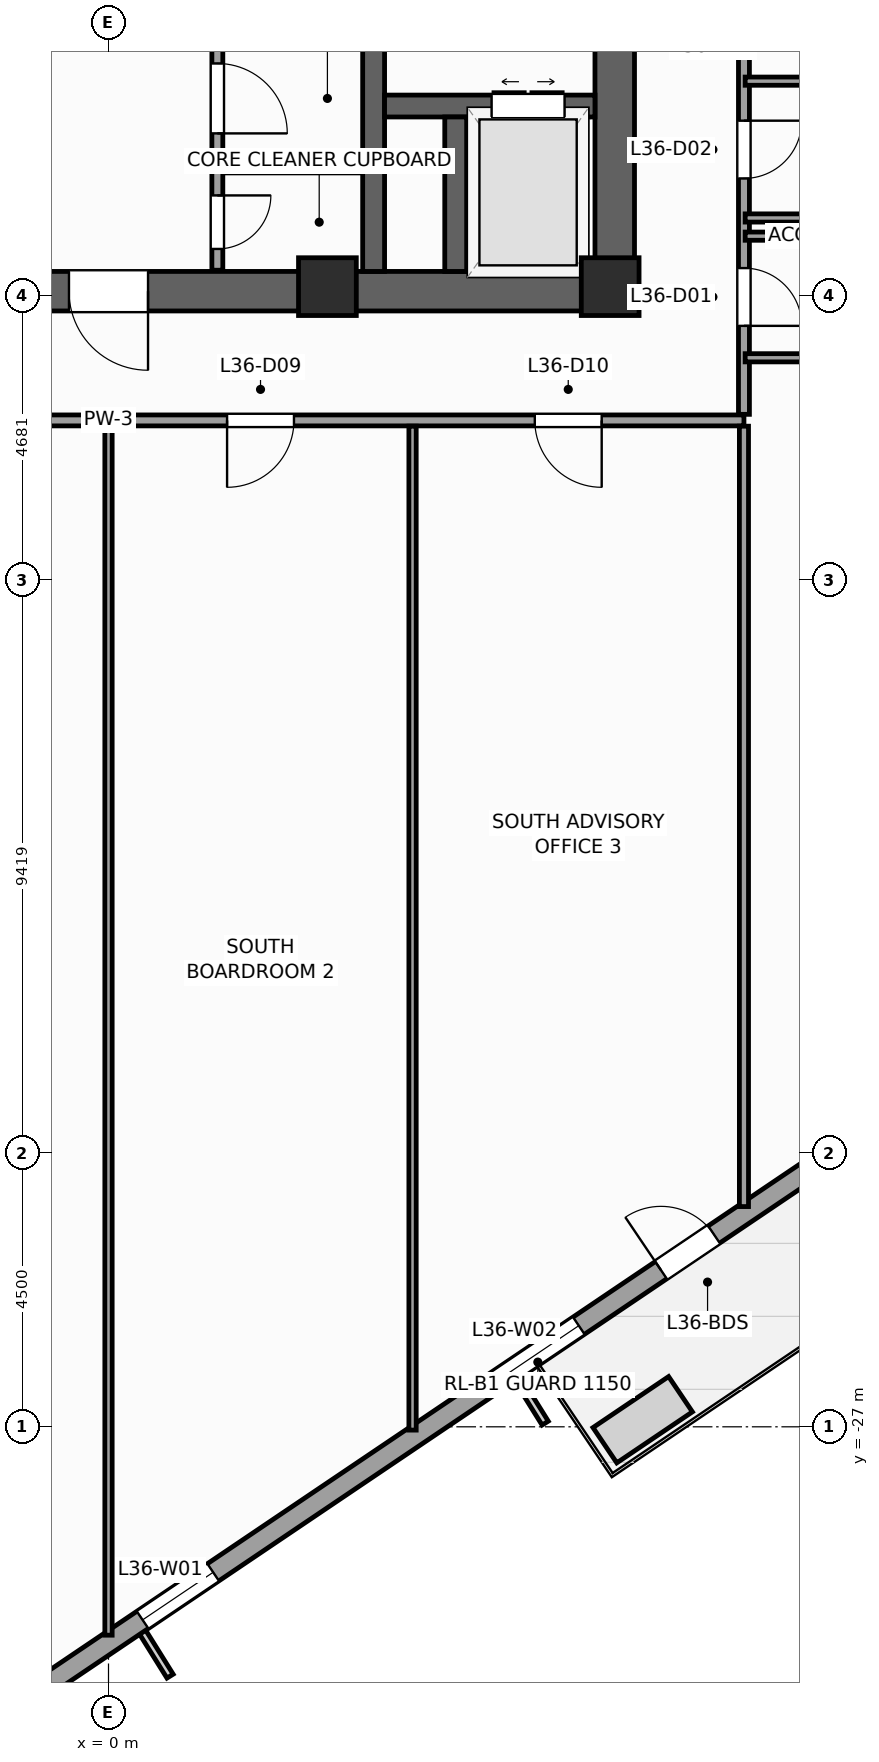
"""IFC4 building model, lengths in metres.
Left out: names, types, materials, properties, quantities, classifications, styles, units other than length and angle.
Written with IfcOpenShell. Run it as: python <this file> out.ifc"""

import sys

from ifc_helpers import new_model, si_unit, direction, frame, frame_2d, origin, origin_2d, place, context, subcontext, project, spatial, rectangle, extrude, source, transform, mapped, element, fill, save


model = new_model("IFC4")
c1 = context("Model", 3, precision=1e-05, world=origin(), true_north=direction((0.0, 1.0)))
c2 = subcontext(c1, "Body", "Model", "MODEL_VIEW")
j1 = project(units=[si_unit("LENGTHUNIT", "METRE"), si_unit("PLANEANGLEUNIT", "RADIAN")], contexts=[c1])
p1 = place(None, origin())
s1 = spatial("IfcSite", under=j1, at=p1, CompositionType="ELEMENT")
p2 = place(p1, origin())
s2 = spatial("IfcBuilding", under=s1, at=p2, CompositionType="ELEMENT")
p3 = place(p2, frame((0.0, 0.0, 152.4)))
s3 = spatial("IfcBuildingStorey", under=s2, at=p3, CompositionType="ELEMENT", Elevation=152.4)
p4 = place(p3, frame((-8.65, -8.325, 0.0), z_axis=(0.0, 0.0, 1.0), x_axis=(1.0, 0.0, 0.0)))
e1 = element("IfcWall", 1, at=p4, inside=s3, PredefinedType="SHEAR", context=c2, shape_type="SweptSolid", body=[
    extrude(rectangle(XDim=17.3, YDim=0.65, at=frame_2d((8.65, 0.0))), origin(), (0.0, 0.0, 1.0), 4.0),
])
p5 = place(p4, frame((8.0, 0.0, 0.0)))
e2 = element("IfcOpeningElement", 2, at=p5, cuts=e1, PredefinedType="OPENING", context=c2, shape_type="SweptSolid", body=[
    extrude(rectangle(XDim=1.3, YDim=2.2, at=frame_2d((0.65, 1.1))), frame((0.0, 0.335, 0.0), z_axis=(0.0, -1.0, 0.0), x_axis=(1.0, 0.0, 0.0)), (0.0, 0.0, 1.0), 0.67),
])
p6 = place(p3, frame((8.325, -8.0, 0.0), z_axis=(0.0, 0.0, 1.0), x_axis=(0.0, 1.0, 0.0)))
e3 = element("IfcWall", 3, at=p6, inside=s3, PredefinedType="SHEAR", context=c2, shape_type="SweptSolid", body=[
    extrude(rectangle(XDim=16.0, YDim=0.65, at=frame_2d((8.0, 0.0))), origin(), (0.0, 0.0, 1.0), 4.0),
])
p7 = place(p6, frame((4.69, 0.0, 0.0)))
e4 = element("IfcOpeningElement", 4, at=p7, cuts=e3, PredefinedType="OPENING", context=c2, shape_type="SweptSolid", body=[
    extrude(rectangle(XDim=1.3, YDim=2.2, at=frame_2d((0.65, 1.1))), frame((0.0, 0.335, 0.0), z_axis=(0.0, -1.0, 0.0), x_axis=(1.0, 0.0, 0.0)), (0.0, 0.0, 1.0), 0.67),
])
p8 = place(p3, frame((4.36, -8.0, 0.0), z_axis=(0.0, 0.0, 1.0), x_axis=(0.0, 1.0, 0.0)))
e5 = element("IfcWall", 5, at=p8, inside=s3, PredefinedType="SHEAR", context=c2, shape_type="SweptSolid", body=[
    extrude(rectangle(XDim=16.0, YDim=0.36, at=frame_2d((8.0, 0.0))), origin(), (0.0, 0.0, 1.0), 4.0),
])
p9 = place(p3, frame((4.54, -5.28, 0.0), z_axis=(0.0, 0.0, 1.0), x_axis=(1.0, 0.0, 0.0)))
e6 = element("IfcWall", 6, at=p9, inside=s3, PredefinedType="SHEAR", context=c2, shape_type="SweptSolid", body=[
    extrude(rectangle(XDim=3.46, YDim=0.36, at=frame_2d((1.73, 0.0))), origin(), (0.0, 0.0, 1.0), 4.0),
])
p10 = place(p9, frame((1.76, 0.0, 0.0)))
e7 = element("IfcOpeningElement", 7, at=p10, cuts=e6, PredefinedType="OPENING", context=c2, shape_type="SweptSolid", body=[
    extrude(rectangle(XDim=1.2, YDim=2.25, at=frame_2d((0.6, 1.125))), frame((0.0, 0.19, 0.0), z_axis=(0.0, -1.0, 0.0), x_axis=(1.0, 0.0, 0.0)), (0.0, 0.0, 1.0), 0.38),
])
p11 = place(p3, frame((5.71, -8.0, 0.0), z_axis=(0.0, 0.0, 1.0), x_axis=(0.0, 1.0, 0.0)))
e8 = element("IfcWall", 8, at=p11, inside=s3, PredefinedType="SHEAR", context=c2, shape_type="SweptSolid", body=[
    extrude(rectangle(XDim=2.54, YDim=0.36, at=frame_2d((1.27, 0.0))), origin(), (0.0, 0.0, 1.0), 4.0),
])
m1 = source(origin(), c2, "Body", "SweptSolid", [
    extrude(rectangle(XDim=0.95, YDim=0.95, at=origin_2d()), origin(), (0.0, 0.0, 1.0), 4.0),
])
for number, where, z_axis, x_axis in (
    (9, (8.25, -8.25, 0.0), (0.0, 0.0, 1.0), (1.0, 0.0, 0.0)),
    (10, (3.6, -8.25, 0.0), (0.0, 0.0, 1.0), (1.0, 0.0, 0.0)),
):
    element("IfcColumn", number, at=place(p3, frame(where, z_axis=z_axis, x_axis=x_axis)), inside=s3, PredefinedType="PILASTER", context=c2, shape_type="MappedRepresentation", body=[
        mapped(m1, transform((0.0, 0.0, 0.0), scale=1.0)),
    ])
p12 = place(p3, frame((-2.972, -32.558, 0.0), z_axis=(0.0, 0.0, 1.0), x_axis=(0.829036218961, 0.559194910251, 0.0)))
e11 = element("IfcWall", 11, at=p12, inside=s3, PredefinedType="STANDARD", context=c2, shape_type="SweptSolid", body=[
    extrude(rectangle(XDim=41.34, YDim=0.34, at=frame_2d((20.67, 0.0))), origin(), (0.0, 0.0, 1.0), 3.04),
])
p13 = place(p12, frame((14.545, 0.0, 0.0)))
e12 = element("IfcOpeningElement", 12, at=p13, cuts=e11, PredefinedType="OPENING", context=c2, shape_type="SweptSolid", body=[
    extrude(rectangle(XDim=1.05, YDim=2.25, at=frame_2d((0.525, 1.125))), frame((0.0, 0.18, 0.0), z_axis=(0.0, -1.0, 0.0), x_axis=(1.0, 0.0, 0.0)), (0.0, 0.0, 1.0), 0.36),
])
p14 = place(p12, frame((4.261, 0.0, 0.56)))
e13 = element("IfcOpeningElement", 13, at=p14, cuts=e11, PredefinedType="OPENING", context=c2, shape_type="SweptSolid", body=[
    extrude(rectangle(XDim=1.4, YDim=2.4, at=frame_2d((0.7, 1.2))), frame((0.0, 0.18, 0.0), z_axis=(0.0, -1.0, 0.0), x_axis=(1.0, 0.0, 0.0)), (0.0, 0.0, 1.0), 0.36),
])
p15 = place(p12, frame((11.064, 0.0, 0.61)))
e14 = element("IfcOpeningElement", 14, at=p15, cuts=e11, PredefinedType="OPENING", context=c2, shape_type="SweptSolid", body=[
    extrude(rectangle(XDim=1.85, YDim=2.35, at=frame_2d((0.925, 1.175))), frame((0.0, 0.18, 0.0), z_axis=(0.0, -1.0, 0.0), x_axis=(1.0, 0.0, 0.0)), (0.0, 0.0, 1.0), 0.36),
])
p16 = place(p12, frame((18.168, 0.0, 0.61)))
e15 = element("IfcOpeningElement", 15, at=p16, cuts=e11, PredefinedType="OPENING", context=c2, shape_type="SweptSolid", body=[
    extrude(rectangle(XDim=1.85, YDim=2.35, at=frame_2d((0.925, 1.175))), frame((0.0, 0.18, 0.0), z_axis=(0.0, -1.0, 0.0), x_axis=(1.0, 0.0, 0.0)), (0.0, 0.0, 1.0), 0.36),
])
p17 = place(p12, frame((27.186, 0.0, 0.61)))
e16 = element("IfcOpeningElement", 16, at=p17, cuts=e11, PredefinedType="OPENING", context=c2, shape_type="SweptSolid", body=[
    extrude(rectangle(XDim=1.85, YDim=2.35, at=frame_2d((0.925, 1.175))), frame((0.0, 0.18, 0.0), z_axis=(0.0, -1.0, 0.0), x_axis=(1.0, 0.0, 0.0)), (0.0, 0.0, 1.0), 0.36),
])
p18 = place(p12, frame((34.852, 0.0, 0.56)))
e17 = element("IfcOpeningElement", 17, at=p18, cuts=e11, PredefinedType="OPENING", context=c2, shape_type="SweptSolid", body=[
    extrude(rectangle(XDim=1.4, YDim=2.4, at=frame_2d((0.7, 1.2))), frame((0.0, 0.18, 0.0), z_axis=(0.0, -1.0, 0.0), x_axis=(1.0, 0.0, 0.0)), (0.0, 0.0, 1.0), 0.36),
])
p19 = place(p3, frame((1.79, -7.98, 0.0), z_axis=(0.0, 0.0, 1.0), x_axis=(0.0, 1.0, 0.0)))
e18 = element("IfcWall", 18, at=p19, inside=s3, PredefinedType="PARTITIONING", context=c2, shape_type="SweptSolid", body=[
    extrude(rectangle(XDim=12.38, YDim=0.18, at=frame_2d((6.19, 0.0))), origin(), (0.0, 0.0, 1.0), 3.74),
])
p20 = place(p19, frame((4.6, 0.0, 0.0)))
e19 = element("IfcOpeningElement", 19, at=p20, cuts=e18, PredefinedType="OPENING", context=c2, shape_type="SweptSolid", body=[
    extrude(rectangle(XDim=1.1, YDim=2.2, at=frame_2d((0.55, 1.1))), frame((0.0, 0.1, 0.0), z_axis=(0.0, -1.0, 0.0), x_axis=(1.0, 0.0, 0.0)), (0.0, 0.0, 1.0), 0.2),
])
p21 = place(p19, frame((6.66, 0.0, 0.0)))
e20 = element("IfcOpeningElement", 20, at=p21, cuts=e18, PredefinedType="OPENING", context=c2, shape_type="SweptSolid", body=[
    extrude(rectangle(XDim=1.1, YDim=2.2, at=frame_2d((0.55, 1.1))), frame((0.0, 0.1, 0.0), z_axis=(0.0, -1.0, 0.0), x_axis=(1.0, 0.0, 0.0)), (0.0, 0.0, 1.0), 0.2),
])
p22 = place(p19, frame((0.35, 0.0, 0.0)))
e21 = element("IfcOpeningElement", 21, at=p22, cuts=e18, PredefinedType="OPENING", context=c2, shape_type="SweptSolid", body=[
    extrude(rectangle(XDim=0.88, YDim=2.1, at=frame_2d((0.44, 1.05))), frame((0.0, 0.1, 0.0), z_axis=(0.0, -1.0, 0.0), x_axis=(1.0, 0.0, 0.0)), (0.0, 0.0, 1.0), 0.2),
])
p23 = place(p19, frame((2.25, 0.0, 0.0)))
e22 = element("IfcOpeningElement", 22, at=p23, cuts=e18, PredefinedType="OPENING", context=c2, shape_type="SweptSolid", body=[
    extrude(rectangle(XDim=1.15, YDim=2.25, at=frame_2d((0.575, 1.125))), frame((0.0, 0.1, 0.0), z_axis=(0.0, -1.0, 0.0), x_axis=(1.0, 0.0, 0.0)), (0.0, 0.0, 1.0), 0.2),
])
p24 = place(p3, frame((1.89, -6.3, 0.0), z_axis=(0.0, 0.0, 1.0), x_axis=(1.0, 0.0, 0.0)))
e23 = element("IfcWall", 23, at=p24, inside=s3, PredefinedType="PARTITIONING", context=c2, shape_type="SweptSolid", body=[
    extrude(rectangle(XDim=2.28, YDim=0.16, at=frame_2d((1.14, 0.0))), origin(), (0.0, 0.0, 1.0), 3.74),
])
p25 = place(p3, frame((-10.45, -10.45, 0.0), z_axis=(0.0, 0.0, 1.0), x_axis=(1.0, 0.0, 0.0)))
e24 = element("IfcWall", 24, at=p25, inside=s3, PredefinedType="PARTITIONING", context=c2, shape_type="SweptSolid", body=[
    extrude(rectangle(XDim=20.9, YDim=0.18, at=frame_2d((10.45, 0.0))), origin(), (0.0, 0.0, 1.0), 3.74),
])
p26 = place(p25, frame((2.339, 0.0, 0.0)))
e25 = element("IfcOpeningElement", 25, at=p26, cuts=e24, PredefinedType="OPENING", context=c2, shape_type="SweptSolid", body=[
    extrude(rectangle(XDim=1.1, YDim=2.2, at=frame_2d((0.55, 1.1))), frame((0.0, 0.1, 0.0), z_axis=(0.0, -1.0, 0.0), x_axis=(1.0, 0.0, 0.0)), (0.0, 0.0, 1.0), 0.2),
])
p27 = place(p25, frame((7.4, 0.0, 0.0)))
e26 = element("IfcOpeningElement", 26, at=p27, cuts=e24, PredefinedType="OPENING", context=c2, shape_type="SweptSolid", body=[
    extrude(rectangle(XDim=1.1, YDim=2.2, at=frame_2d((0.55, 1.1))), frame((0.0, 0.1, 0.0), z_axis=(0.0, -1.0, 0.0), x_axis=(1.0, 0.0, 0.0)), (0.0, 0.0, 1.0), 0.2),
])
p28 = place(p25, frame((12.4, 0.0, 0.0)))
e27 = element("IfcOpeningElement", 27, at=p28, cuts=e24, PredefinedType="OPENING", context=c2, shape_type="SweptSolid", body=[
    extrude(rectangle(XDim=1.1, YDim=2.2, at=frame_2d((0.55, 1.1))), frame((0.0, 0.1, 0.0), z_axis=(0.0, -1.0, 0.0), x_axis=(1.0, 0.0, 0.0)), (0.0, 0.0, 1.0), 0.2),
])
p29 = place(p25, frame((17.46, 0.0, 0.0)))
e28 = element("IfcOpeningElement", 28, at=p29, cuts=e24, PredefinedType="OPENING", context=c2, shape_type="SweptSolid", body=[
    extrude(rectangle(XDim=1.1, YDim=2.2, at=frame_2d((0.55, 1.1))), frame((0.0, 0.1, 0.0), z_axis=(0.0, -1.0, 0.0), x_axis=(1.0, 0.0, 0.0)), (0.0, 0.0, 1.0), 0.2),
])
p30 = place(p3, frame((10.45, -10.35, 0.0), z_axis=(0.0, 0.0, 1.0), x_axis=(0.0, 1.0, 0.0)))
e29 = element("IfcWall", 29, at=p30, inside=s3, PredefinedType="PARTITIONING", context=c2, shape_type="SweptSolid", body=[
    extrude(rectangle(XDim=8.95, YDim=0.18, at=frame_2d((4.475, 0.0))), origin(), (0.0, 0.0, 1.0), 3.74),
])
p31 = place(p30, frame((1.455, 0.0, 0.0)))
e30 = element("IfcOpeningElement", 30, at=p31, cuts=e29, PredefinedType="OPENING", context=c2, shape_type="SweptSolid", body=[
    extrude(rectangle(XDim=0.95, YDim=2.1, at=frame_2d((0.475, 1.05))), frame((0.0, 0.1, 0.0), z_axis=(0.0, -1.0, 0.0), x_axis=(1.0, 0.0, 0.0)), (0.0, 0.0, 1.0), 0.2),
])
p32 = place(p30, frame((3.879, 0.0, 0.0)))
e31 = element("IfcOpeningElement", 31, at=p32, cuts=e29, PredefinedType="OPENING", context=c2, shape_type="SweptSolid", body=[
    extrude(rectangle(XDim=0.95, YDim=2.1, at=frame_2d((0.475, 1.05))), frame((0.0, 0.1, 0.0), z_axis=(0.0, -1.0, 0.0), x_axis=(1.0, 0.0, 0.0)), (0.0, 0.0, 1.0), 0.2),
])
p33 = place(p30, frame((6.494, 0.0, 0.0)))
e32 = element("IfcOpeningElement", 32, at=p33, cuts=e29, PredefinedType="OPENING", context=c2, shape_type="SweptSolid", body=[
    extrude(rectangle(XDim=1.1, YDim=2.2, at=frame_2d((0.55, 1.1))), frame((0.0, 0.1, 0.0), z_axis=(0.0, -1.0, 0.0), x_axis=(1.0, 0.0, 0.0)), (0.0, 0.0, 1.0), 0.2),
])
p34 = place(p3, frame((0.0, -30.427, 0.0), z_axis=(0.0, 0.0, 1.0), x_axis=(0.0, 1.0, 0.0)))
e33 = element("IfcWall", 33, at=p34, inside=s3, PredefinedType="PARTITIONING", context=c2, shape_type="SweptSolid", body=[
    extrude(rectangle(XDim=19.882, YDim=0.12, at=frame_2d((9.941, 0.0))), origin(), (0.0, 0.0, 1.0), 3.74),
])
p35 = place(p3, frame((5.0, -27.054, 0.0), z_axis=(0.0, 0.0, 1.0), x_axis=(0.0, 1.0, 0.0)))
e34 = element("IfcWall", 34, at=p35, inside=s3, PredefinedType="PARTITIONING", context=c2, shape_type="SweptSolid", body=[
    extrude(rectangle(XDim=16.509, YDim=0.12, at=frame_2d((8.255, 0.0))), origin(), (0.0, 0.0, 1.0), 3.74),
])
p36 = place(p3, frame((10.45, -23.378, 0.0), z_axis=(0.0, 0.0, 1.0), x_axis=(0.0, 1.0, 0.0)))
e35 = element("IfcWall", 35, at=p36, inside=s3, PredefinedType="PARTITIONING", context=c2, shape_type="SweptSolid", body=[
    extrude(rectangle(XDim=12.833, YDim=0.15, at=frame_2d((6.417, 0.0))), origin(), (0.0, 0.0, 1.0), 3.74),
])
for number, where, z_axis, x_axis in (
    (36, (10.47, -9.42, 0.0), (0.0, 0.0, 1.0), (1.0, 0.0, 0.0)),
    (37, (10.47, -7.42, 0.0), (0.0, 0.0, 1.0), (1.0, 0.0, 0.0)),
):
    element("IfcWall", number, at=place(p3, frame(where, z_axis=z_axis, x_axis=x_axis)), inside=s3, PredefinedType="PARTITIONING", context=c2, shape_type="SweptSolid", body=[
        extrude(rectangle(XDim=2.9, YDim=0.135, at=frame_2d((1.45, 0.0))), origin(), (0.0, 0.0, 1.0), 3.74),
    ])
for number, where, z_axis, x_axis in (
    (38, (10.47, -7.121, 0.0), (0.0, 0.0, 1.0), (1.0, 0.0, 0.0)),
    (39, (10.47, -4.871, 0.0), (0.0, 0.0, 1.0), (1.0, 0.0, 0.0)),
):
    element("IfcWall", number, at=place(p3, frame(where, z_axis=z_axis, x_axis=x_axis)), inside=s3, PredefinedType="PARTITIONING", context=c2, shape_type="SweptSolid", body=[
        extrude(rectangle(XDim=3.7, YDim=0.135, at=frame_2d((1.85, 0.0))), origin(), (0.0, 0.0, 1.0), 3.74),
    ])
m2 = source(origin(), c2, "Body", "SweptSolid", [
    extrude(rectangle(XDim=1.05, YDim=2.25, at=frame_2d((0.525, 1.125))), frame((0.0, 0.025, 0.0), z_axis=(0.0, -1.0, 0.0), x_axis=(1.0, 0.0, 0.0)), (0.0, 0.0, 1.0), 0.05),
])
p37 = place(p13, origin())
e40 = element("IfcDoor", 40, at=p37, inside=s3, OperationType="SINGLE_SWING_LEFT", PredefinedType="DOOR", context=c2, shape_type="MappedRepresentation", body=[
    mapped(m2, transform((0.0, 0.0, 0.0), scale=1.0)),
])
fill(e12, e40)
m3 = source(origin(), c2, "Body", "SweptSolid", [
    extrude(rectangle(XDim=1.4, YDim=2.4, at=frame_2d((0.7, 1.2))), frame((0.0, 0.03, 0.0), z_axis=(0.0, -1.0, 0.0), x_axis=(1.0, 0.0, 0.0)), (0.0, 0.0, 1.0), 0.06),
])
p38 = place(p14, origin())
e41 = element("IfcWindow", 41, at=p38, inside=s3, PartitioningType="SINGLE_PANEL", PredefinedType="WINDOW", context=c2, shape_type="MappedRepresentation", body=[
    mapped(m3, transform((0.0, 0.0, 0.0), scale=1.0)),
])
fill(e13, e41)
m4 = source(origin(), c2, "Body", "SweptSolid", [
    extrude(rectangle(XDim=1.85, YDim=2.35, at=frame_2d((0.925, 1.175))), frame((0.0, 0.03, 0.0), z_axis=(0.0, -1.0, 0.0), x_axis=(1.0, 0.0, 0.0)), (0.0, 0.0, 1.0), 0.06),
])
p39 = place(p15, origin())
e42 = element("IfcWindow", 42, at=p39, inside=s3, PartitioningType="SINGLE_PANEL", PredefinedType="WINDOW", context=c2, shape_type="MappedRepresentation", body=[
    mapped(m4, transform((0.0, 0.0, 0.0), scale=1.0)),
])
fill(e14, e42)
m5 = source(origin(), c2, "Body", "SweptSolid", [
    extrude(rectangle(XDim=1.3, YDim=2.2, at=frame_2d((0.65, 1.1))), frame((0.0, 0.025, 0.0), z_axis=(0.0, -1.0, 0.0), x_axis=(1.0, 0.0, 0.0)), (0.0, 0.0, 1.0), 0.05),
])
p40 = place(p5, frame((1.3, 0.0, 0.0), z_axis=(0.0, 0.0, 1.0), x_axis=(-1.0, 0.0, 0.0)))
e43 = element("IfcDoor", 43, at=p40, inside=s3, OperationType="SINGLE_SWING_RIGHT", PredefinedType="DOOR", context=c2, shape_type="MappedRepresentation", body=[
    mapped(m5, transform((0.0, 0.0, 0.0), scale=1.0)),
])
fill(e2, e43)
m6 = source(origin(), c2, "Body", "SweptSolid", [
    extrude(rectangle(XDim=1.2, YDim=2.25, at=frame_2d((0.6, 1.125))), frame((0.0, 0.025, 0.0), z_axis=(0.0, -1.0, 0.0), x_axis=(1.0, 0.0, 0.0)), (0.0, 0.0, 1.0), 0.05),
])
p41 = place(p10, origin())
e44 = element("IfcDoor", 44, at=p41, inside=s3, OperationType="DOUBLE_DOOR_SLIDING", PredefinedType="DOOR", context=c2, shape_type="MappedRepresentation", body=[
    mapped(m6, transform((0.0, 0.0, 0.0), scale=1.0)),
])
fill(e7, e44)
m7 = source(origin(), c2, "Body", "SweptSolid", [
    extrude(rectangle(XDim=0.88, YDim=2.1, at=frame_2d((0.44, 1.05))), frame((0.0, 0.025, 0.0), z_axis=(0.0, -1.0, 0.0), x_axis=(1.0, 0.0, 0.0)), (0.0, 0.0, 1.0), 0.05),
])
p42 = place(p22, frame((0.88, 0.0, 0.0), z_axis=(0.0, 0.0, 1.0), x_axis=(-1.0, 0.0, 0.0)))
e45 = element("IfcDoor", 45, at=p42, inside=s3, OperationType="SINGLE_SWING_RIGHT", PredefinedType="DOOR", context=c2, shape_type="MappedRepresentation", body=[
    mapped(m7, transform((0.0, 0.0, 0.0), scale=1.0)),
])
fill(e21, e45)
m8 = source(origin(), c2, "Body", "SweptSolid", [
    extrude(rectangle(XDim=1.15, YDim=2.25, at=frame_2d((0.575, 1.125))), frame((0.0, 0.025, 0.0), z_axis=(0.0, -1.0, 0.0), x_axis=(1.0, 0.0, 0.0)), (0.0, 0.0, 1.0), 0.05),
])
p43 = place(p23, frame((1.15, 0.0, 0.0), z_axis=(0.0, 0.0, 1.0), x_axis=(-1.0, 0.0, 0.0)))
e46 = element("IfcDoor", 46, at=p43, inside=s3, OperationType="SINGLE_SWING_LEFT", PredefinedType="DOOR", context=c2, shape_type="MappedRepresentation", body=[
    mapped(m8, transform((0.0, 0.0, 0.0), scale=1.0)),
])
fill(e22, e46)
m9 = source(origin(), c2, "Body", "SweptSolid", [
    extrude(rectangle(XDim=0.95, YDim=2.1, at=frame_2d((0.475, 1.05))), frame((0.0, 0.025, 0.0), z_axis=(0.0, -1.0, 0.0), x_axis=(1.0, 0.0, 0.0)), (0.0, 0.0, 1.0), 0.05),
])
p44 = place(p31, frame((0.95, 0.0, 0.0), z_axis=(0.0, 0.0, 1.0), x_axis=(-1.0, 0.0, 0.0)))
e47 = element("IfcDoor", 47, at=p44, inside=s3, OperationType="SINGLE_SWING_LEFT", PredefinedType="DOOR", context=c2, shape_type="MappedRepresentation", body=[
    mapped(m9, transform((0.0, 0.0, 0.0), scale=1.0)),
])
fill(e30, e47)
p45 = place(p32, frame((0.95, 0.0, 0.0), z_axis=(0.0, 0.0, 1.0), x_axis=(-1.0, 0.0, 0.0)))
e48 = element("IfcDoor", 48, at=p45, inside=s3, OperationType="SINGLE_SWING_RIGHT", PredefinedType="DOOR", context=c2, shape_type="MappedRepresentation", body=[
    mapped(m9, transform((0.0, 0.0, 0.0), scale=1.0)),
])
fill(e31, e48)
m10 = source(origin(), c2, "Body", "SweptSolid", [
    extrude(rectangle(XDim=1.1, YDim=2.2, at=frame_2d((0.55, 1.1))), frame((0.0, 0.025, 0.0), z_axis=(0.0, -1.0, 0.0), x_axis=(1.0, 0.0, 0.0)), (0.0, 0.0, 1.0), 0.05),
])
p46 = place(p28, frame((1.1, 0.0, 0.0), z_axis=(0.0, 0.0, 1.0), x_axis=(-1.0, 0.0, 0.0)))
e49 = element("IfcDoor", 49, at=p46, inside=s3, OperationType="SINGLE_SWING_LEFT", PredefinedType="DOOR", context=c2, shape_type="MappedRepresentation", body=[
    mapped(m10, transform((0.0, 0.0, 0.0), scale=1.0)),
])
fill(e27, e49)
p47 = place(p29, frame((1.1, 0.0, 0.0), z_axis=(0.0, 0.0, 1.0), x_axis=(-1.0, 0.0, 0.0)))
e50 = element("IfcDoor", 50, at=p47, inside=s3, OperationType="SINGLE_SWING_RIGHT", PredefinedType="DOOR", context=c2, shape_type="MappedRepresentation", body=[
    mapped(m10, transform((0.0, 0.0, 0.0), scale=1.0)),
])
fill(e28, e50)
save(model, sys.argv[1])
